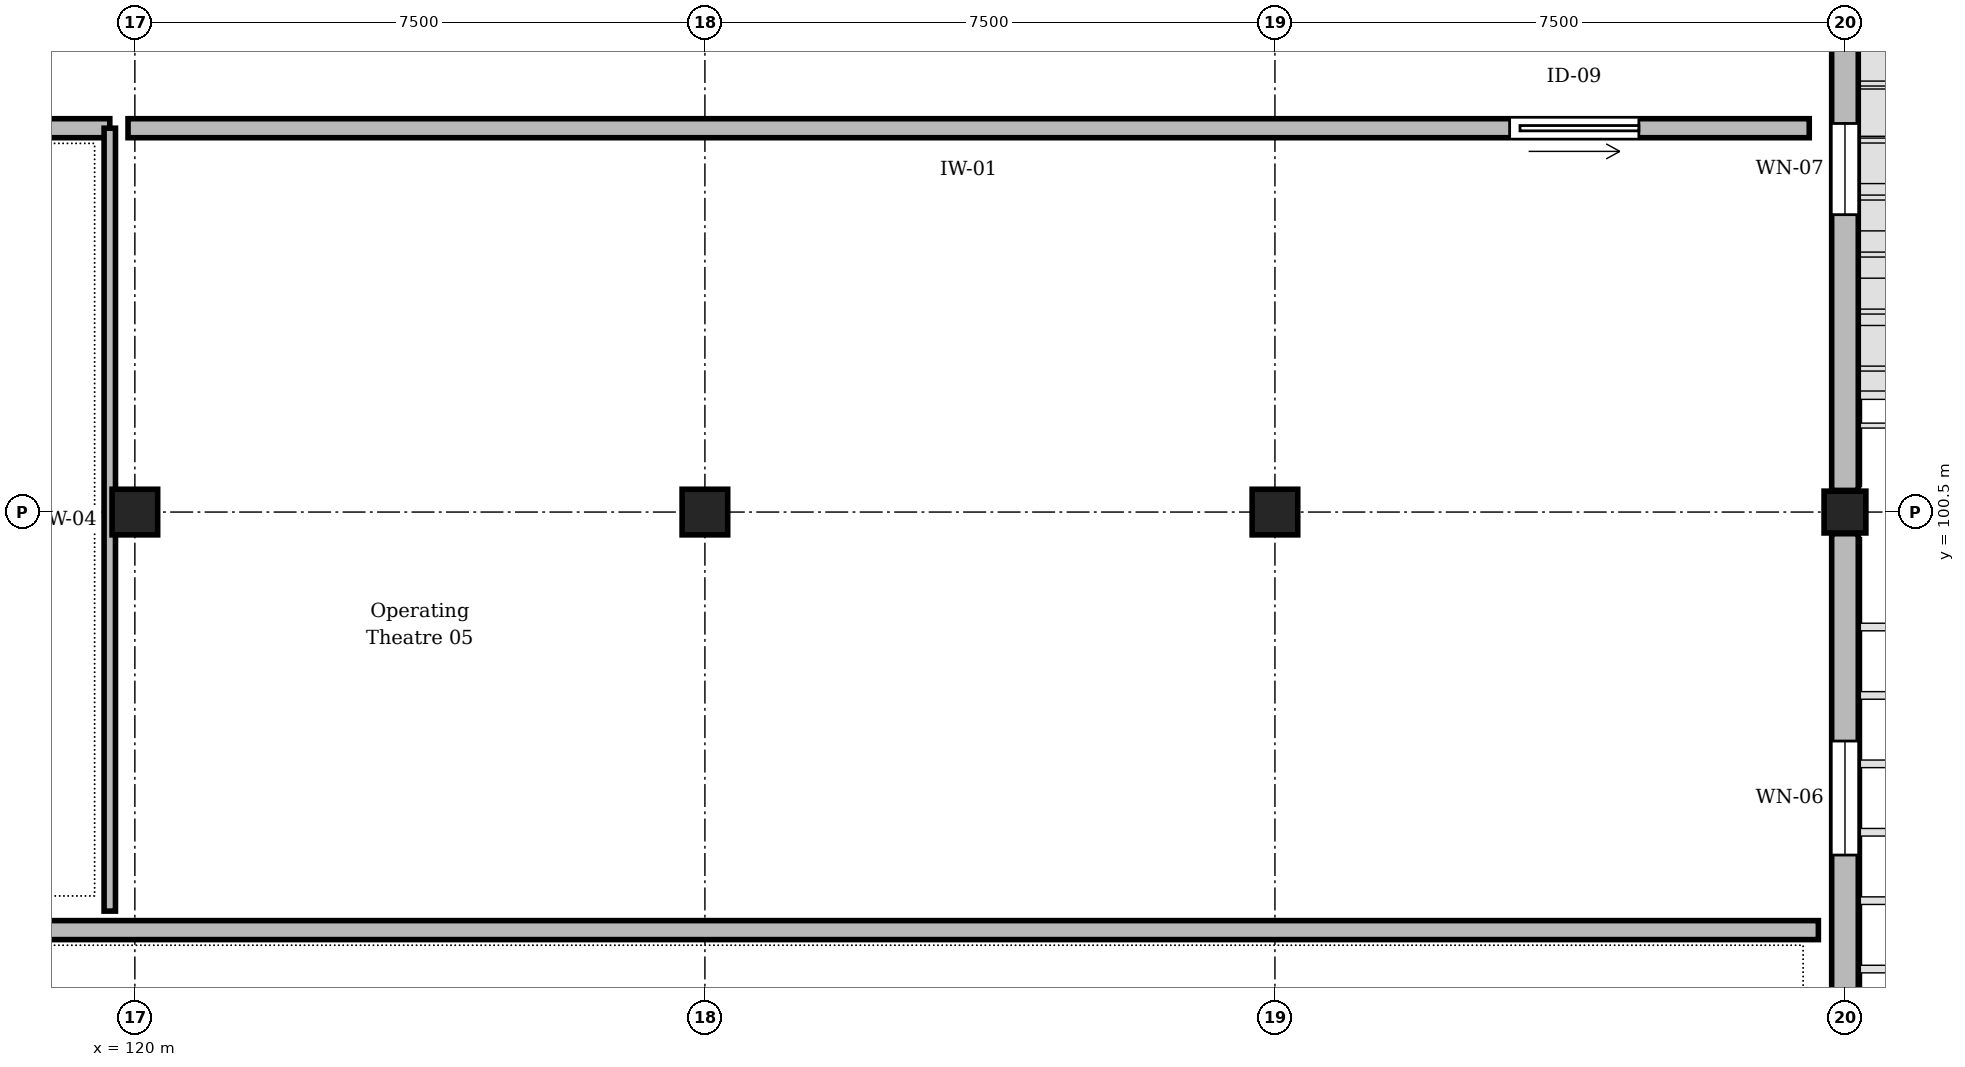
"""IFC4 building model, lengths in metres.
Left out: names, types, materials, properties, quantities, classifications, styles, units other than length and angle.
Written with IfcOpenShell. Run it as: python <this file> out.ifc"""

import sys

from ifc_helpers import new_model, si_unit, direction, frame, frame_2d, origin, origin_2d, place, context, subcontext, project, spatial, rectangle, circle, extrude, element, fill, save


model = new_model("IFC4")
c1 = context("Model", 3, precision=1e-05, world=origin(), true_north=direction((0.0, 1.0)))
c2 = subcontext(c1, "Body", "Model", "MODEL_VIEW")
j1 = project(units=[si_unit("LENGTHUNIT", "METRE"), si_unit("PLANEANGLEUNIT", "RADIAN")], contexts=[c1])
p1 = place(None, origin())
s1 = spatial("IfcSite", under=j1, at=p1, CompositionType="ELEMENT")
p2 = place(p1, origin())
s2 = spatial("IfcBuilding", under=s1, at=p2, CompositionType="ELEMENT")
p3 = place(p2, frame((0.0, 0.0, 9.3)))
s3 = spatial("IfcBuildingStorey", under=s2, at=p3, CompositionType="ELEMENT", Elevation=9.3)
p4 = place(p3, frame((120.0, 100.5, 0.0), z_axis=(0.0, 0.0, 1.0), x_axis=(1.0, 0.0, 0.0)))
e1 = element("IfcColumn", 1, at=p4, inside=s3, PredefinedType="COLUMN", context=c2, shape_type="SweptSolid", body=[
    extrude(rectangle(XDim=0.6, YDim=0.6, at=origin_2d()), origin(), (0.0, 0.0, 1.0), 4.8),
])
p5 = place(p3, frame((127.5, 100.5, 0.0), z_axis=(0.0, 0.0, 1.0), x_axis=(1.0, 0.0, 0.0)))
e2 = element("IfcColumn", 2, at=p5, inside=s3, PredefinedType="COLUMN", context=c2, shape_type="SweptSolid", body=[
    extrude(circle(Radius=0.3, at=origin_2d()), origin(), (0.0, 0.0, 1.0), 4.8),
])
p6 = place(p3, frame((135.0, 100.5, 0.0), z_axis=(0.0, 0.0, 1.0), x_axis=(1.0, 0.0, 0.0)))
e3 = element("IfcColumn", 3, at=p6, inside=s3, PredefinedType="COLUMN", context=c2, shape_type="SweptSolid", body=[
    extrude(rectangle(XDim=0.6, YDim=0.6, at=origin_2d()), origin(), (0.0, 0.0, 1.0), 4.8),
])
p7 = place(p3, frame((142.5, 100.5, 0.0), z_axis=(0.0, 0.0, 1.0), x_axis=(1.0, 0.0, 0.0)))
e4 = element("IfcColumn", 4, at=p7, inside=s3, PredefinedType="COLUMN", context=c2, shape_type="SweptSolid", body=[
    extrude(rectangle(XDim=0.55, YDim=0.55, at=origin_2d()), origin(), (0.0, 0.0, 1.0), 4.8),
])
p8 = place(p3, frame((142.5, 100.215, 0.0), z_axis=(0.0, 0.0, 1.0), x_axis=(0.0, -1.0, 0.0)))
e5 = element("IfcWall", 5, at=p8, inside=s3, PredefinedType="STANDARD", context=c2, shape_type="SweptSolid", body=[
    extrude(rectangle(XDim=6.955, YDim=0.35, at=frame_2d((3.478, 0.0))), origin(), (0.0, 0.0, 1.0), 3.95),
])
p9 = place(p8, frame((2.728, 0.0, 0.9)))
e6 = element("IfcOpeningElement", 6, at=p9, cuts=e5, PredefinedType="OPENING", context=c2, shape_type="SweptSolid", body=[
    extrude(rectangle(XDim=1.5, YDim=2.1, at=frame_2d((0.75, 1.05))), frame((0.0, 0.185, 0.0), z_axis=(0.0, -1.0, 0.0), x_axis=(1.0, 0.0, 0.0)), (0.0, 0.0, 1.0), 0.37),
])
p10 = place(p3, frame((142.5, 109.24, 0.0), z_axis=(0.0, 0.0, 1.0), x_axis=(0.0, -1.0, 0.0)))
e7 = element("IfcWall", 7, at=p10, inside=s3, PredefinedType="STANDARD", context=c2, shape_type="SweptSolid", body=[
    extrude(rectangle(XDim=8.455, YDim=0.35, at=frame_2d((4.228, 0.0))), origin(), (0.0, 0.0, 1.0), 4.0),
])
p11 = place(p10, frame((3.627, 0.0, 0.9)))
e8 = element("IfcOpeningElement", 8, at=p11, cuts=e7, PredefinedType="OPENING", context=c2, shape_type="SweptSolid", body=[
    extrude(rectangle(XDim=1.2, YDim=2.1, at=frame_2d((0.6, 1.05))), frame((0.0, 0.185, 0.0), z_axis=(0.0, -1.0, 0.0), x_axis=(1.0, 0.0, 0.0)), (0.0, 0.0, 1.0), 0.37),
])
p12 = place(p3, frame((142.15, 95.0, 0.0), z_axis=(0.0, 0.0, 1.0), x_axis=(-1.0, 0.0, 0.0)))
e9 = element("IfcWall", 9, at=p12, inside=s3, PredefinedType="STANDARD", context=c2, shape_type="SweptSolid", body=[
    extrude(rectangle(XDim=111.8, YDim=0.25, at=frame_2d((55.9, 0.0))), origin(), (0.0, 0.0, 1.0), 4.535),
])
p13 = place(p12, frame((55.15, 0.0, 0.0)))
e10 = element("IfcOpeningElement", 10, at=p13, cuts=e9, PredefinedType="OPENING", context=c2, shape_type="SweptSolid", body=[
    extrude(rectangle(XDim=1.5, YDim=2.3, at=frame_2d((0.75, 1.15))), frame((0.0, 0.135, 0.0), z_axis=(0.0, -1.0, 0.0), x_axis=(1.0, 0.0, 0.0)), (0.0, 0.0, 1.0), 0.27),
])
p14 = place(p3, frame((119.67, 105.55, 0.0), z_axis=(0.0, 0.0, 1.0), x_axis=(-1.0, 0.0, 0.0)))
e11 = element("IfcWall", 11, at=p14, inside=s3, PredefinedType="STANDARD", context=c2, shape_type="SweptSolid", body=[
    extrude(rectangle(XDim=22.12, YDim=0.25, at=frame_2d((11.06, 0.0))), origin(), (0.0, 0.0, 1.0), 4.535),
])
p15 = place(p14, frame((10.21, 0.0, 0.0)))
e12 = element("IfcOpeningElement", 12, at=p15, cuts=e11, PredefinedType="OPENING", context=c2, shape_type="SweptSolid", body=[
    extrude(rectangle(XDim=1.7, YDim=2.4, at=frame_2d((0.85, 1.2))), frame((0.0, 0.135, 0.0), z_axis=(0.0, -1.0, 0.0), x_axis=(1.0, 0.0, 0.0)), (0.0, 0.0, 1.0), 0.27),
])
p16 = place(p3, frame((142.03, 105.55, 0.0), z_axis=(0.0, 0.0, 1.0), x_axis=(-1.0, 0.0, 0.0)))
e13 = element("IfcWall", 13, at=p16, inside=s3, PredefinedType="STANDARD", context=c2, shape_type="SweptSolid", body=[
    extrude(rectangle(XDim=22.12, YDim=0.25, at=frame_2d((11.06, 0.0))), origin(), (0.0, 0.0, 1.0), 4.535),
])
p17 = place(p16, frame((2.242, 0.0, 0.0)))
e14 = element("IfcOpeningElement", 14, at=p17, cuts=e13, PredefinedType="OPENING", context=c2, shape_type="SweptSolid", body=[
    extrude(rectangle(XDim=1.7, YDim=2.4, at=frame_2d((0.85, 1.2))), frame((0.0, 0.135, 0.0), z_axis=(0.0, -1.0, 0.0), x_axis=(1.0, 0.0, 0.0)), (0.0, 0.0, 1.0), 0.27),
])
p18 = place(p3, frame((119.67, 95.25, 0.0), z_axis=(0.0, 0.0, 1.0), x_axis=(0.0, 1.0, 0.0)))
e15 = element("IfcWall", 15, at=p18, inside=s3, PredefinedType="PARTITIONING", context=c2, shape_type="SweptSolid", body=[
    extrude(rectangle(XDim=10.3, YDim=0.15, at=frame_2d((5.15, 0.0))), origin(), (0.0, 0.0, 1.0), 3.835),
])
p19 = place(p9, origin())
e16 = element("IfcWindow", 16, at=p19, inside=s3, PartitioningType="SINGLE_PANEL", PredefinedType="WINDOW", context=c2, shape_type="SweptSolid", body=[
    extrude(rectangle(XDim=1.5, YDim=2.1, at=frame_2d((0.75, 1.05))), frame((0.0, 0.03, 0.0), z_axis=(0.0, -1.0, 0.0), x_axis=(1.0, 0.0, 0.0)), (0.0, 0.0, 1.0), 0.06),
])
fill(e6, e16)
p20 = place(p11, origin())
e17 = element("IfcWindow", 17, at=p20, inside=s3, PartitioningType="SINGLE_PANEL", PredefinedType="WINDOW", context=c2, shape_type="SweptSolid", body=[
    extrude(rectangle(XDim=1.2, YDim=2.1, at=frame_2d((0.6, 1.05))), frame((0.0, 0.03, 0.0), z_axis=(0.0, -1.0, 0.0), x_axis=(1.0, 0.0, 0.0)), (0.0, 0.0, 1.0), 0.06),
])
fill(e8, e17)
p21 = place(p17, origin())
e18 = element("IfcDoor", 18, at=p21, inside=s3, OperationType="DOUBLE_DOOR_SLIDING", PredefinedType="DOOR", context=c2, shape_type="SweptSolid", body=[
    extrude(rectangle(XDim=1.7, YDim=2.4, at=frame_2d((0.85, 1.2))), frame((0.0, 0.025, 0.0), z_axis=(0.0, -1.0, 0.0), x_axis=(1.0, 0.0, 0.0)), (0.0, 0.0, 1.0), 0.05),
])
fill(e14, e18)
save(model, sys.argv[1])
